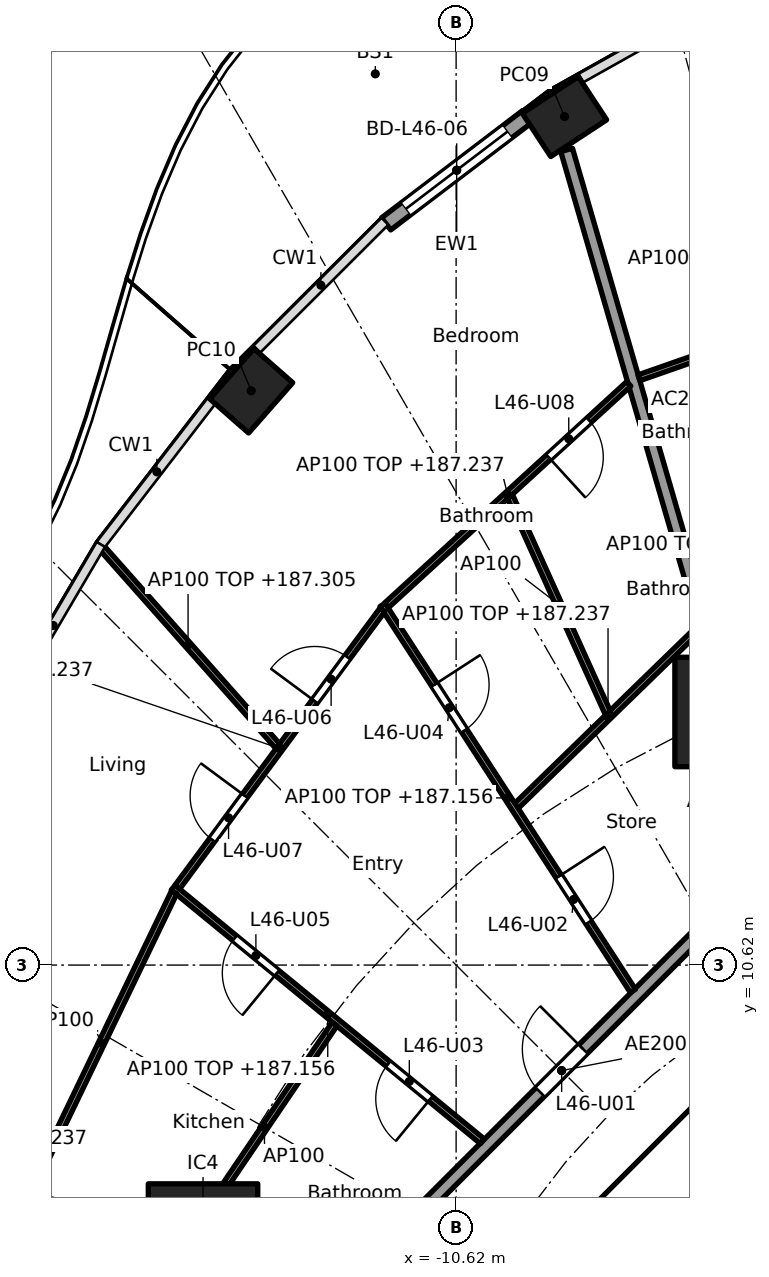
"""IFC4 building model, lengths in metres.
Left out: names, types, materials, properties, quantities, classifications, styles, units other than length and angle.
Written with IfcOpenShell. Run it as: python <this file> out.ifc"""

import sys

from ifc_helpers import new_model, si_unit, direction, frame, frame_2d, origin, origin_2d, place, context, subcontext, project, spatial, rectangle, hollow_rectangle, extrude, element, fill, save


model = new_model("IFC4")
c1 = context("Model", 3, precision=1e-05, world=origin(), true_north=direction((0.0, 1.0)))
c2 = subcontext(c1, "Body", "Model", "MODEL_VIEW")
j1 = project(units=[si_unit("LENGTHUNIT", "METRE"), si_unit("PLANEANGLEUNIT", "RADIAN")], contexts=[c1])
p1 = place(None, origin())
s1 = spatial("IfcSite", under=j1, at=p1, CompositionType="ELEMENT")
p2 = place(p1, origin())
s2 = spatial("IfcBuilding", under=s1, at=p2, CompositionType="ELEMENT")
p3 = place(p2, frame((0.0, 0.0, 184.4)))
s3 = spatial("IfcBuildingStorey", under=s2, at=p3, CompositionType="ELEMENT", Elevation=184.4)
for number, where, z_axis, x_axis in (
    (1, (-8.837, 24.573, 0.0), (0.0, 0.0, 1.0), (-0.836, -0.549, 0.0)),
    (2, (-13.989, 20.064, 0.0), (0.0, 0.0, 1.0), (-0.66, -0.751, 0.0)),
):
    element("IfcColumn", number, at=place(p3, frame(where, z_axis=z_axis, x_axis=x_axis)), inside=s3, PredefinedType="COLUMN", context=c2, shape_type="SweptSolid", body=[
        extrude(hollow_rectangle(XDim=1.1, YDim=0.85, WallThickness=0.036, at=origin_2d()), origin(), (0.0, 0.0, 1.0), 3.7),
    ])
for number, where, z_axis, x_axis in (
    (3, (-6.123, 14.782, 0.0), (0.0, 0.0, 1.0), (1.0, 0.0, 0.0)),
    (4, (-14.782, 6.123, 0.0), (0.0, 0.0, 1.0), (1.0, 0.0, 0.0)),
):
    element("IfcColumn", number, at=place(p3, frame(where, z_axis=z_axis, x_axis=x_axis)), inside=s3, PredefinedType="COLUMN", context=c2, shape_type="SweptSolid", body=[
        extrude(rectangle(XDim=1.8, YDim=1.8, at=origin_2d()), origin(), (0.0, 0.0, 1.0), 3.7),
    ])
p4 = place(p3, frame((-11.772, 22.809, 0.0), z_axis=(0.0, 0.0, 1.0), x_axis=(0.796055733703, 0.60522332146, 0.0)))
e5 = element("IfcWall", 5, at=p4, inside=s3, PredefinedType="SOLIDWALL", context=c2, shape_type="SweptSolid", body=[
    extrude(rectangle(XDim=2.917, YDim=0.25, at=frame_2d((1.458, 0.0))), origin(), (0.0, 0.0, 1.0), 3.44),
])
p5 = place(p4, frame((0.408, 0.0, 0.0)))
e6 = element("IfcOpeningElement", 6, at=p5, cuts=e5, PredefinedType="OPENING", context=c2, shape_type="SweptSolid", body=[
    extrude(rectangle(XDim=2.1, YDim=2.4, at=frame_2d((1.05, 1.2))), frame((0.0, 0.135, 0.0), z_axis=(0.0, -1.0, 0.0), x_axis=(1.0, 0.0, 0.0)), (0.0, 0.0, 1.0), 0.27),
])
p6 = place(p3, frame((-4.613, 9.988, 0.0), z_axis=(0.0, 0.0, 1.0), x_axis=(-0.707106781187, -0.707106781187, 0.0)))
e7 = element("IfcWall", 7, at=p6, inside=s3, PredefinedType="SHEAR", context=c2, shape_type="SweptSolid", body=[
    extrude(rectangle(XDim=7.602, YDim=0.6, at=frame_2d((3.801, 0.0))), origin(), (0.0, 0.0, 1.0), 3.44),
])
p7 = place(p6, frame((0.351, 0.0, 0.0)))
e8 = element("IfcOpeningElement", 8, at=p7, cuts=e7, PredefinedType="OPENING", context=c2, shape_type="SweptSolid", body=[
    extrude(rectangle(XDim=1.1, YDim=2.1, at=frame_2d((0.55, 1.05))), frame((0.0, 0.31, 0.0), z_axis=(0.0, -1.0, 0.0), x_axis=(1.0, 0.0, 0.0)), (0.0, 0.0, 1.0), 0.62),
])
p8 = place(p3, frame((-6.137, 14.83, 0.0), z_axis=(0.0, 0.0, 1.0), x_axis=(-0.278461169897, 0.96044748782, 0.0)))
e9 = element("IfcWall", 9, at=p8, inside=s3, PredefinedType="PARTITIONING", context=c2, shape_type="SweptSolid", body=[
    extrude(rectangle(XDim=9.573, YDim=0.2, at=frame_2d((4.787, 0.0))), origin(), (0.0, 0.0, 1.0), 2.837),
])
p9 = place(p3, frame((-14.831, 6.134, 0.0), z_axis=(0.0, 0.0, 1.0), x_axis=(-0.976568396888, 0.215207263354, 0.0)))
e10 = element("IfcWall", 10, at=p9, inside=s3, PredefinedType="PARTITIONING", context=c2, shape_type="SweptSolid", body=[
    extrude(rectangle(XDim=5.177, YDim=0.2, at=frame_2d((2.588, 0.0))), origin(), (0.0, 0.0, 1.0), 2.837),
])
p10 = place(p3, frame((-5.275, 12.494, 0.0), z_axis=(0.0, 0.0, 1.0), x_axis=(-0.707106781187, -0.707106781187, 0.0)))
e11 = element("IfcWall", 11, at=p10, inside=s3, PredefinedType="PARTITIONING", context=c2, shape_type="SweptSolid", body=[
    extrude(rectangle(XDim=10.209, YDim=0.2, at=frame_2d((5.104, 0.0))), origin(), (0.0, 0.0, 1.0), 3.44),
])
p11 = place(p10, frame((4.604, 0.0, 0.0)))
e12 = element("IfcOpeningElement", 12, at=p11, cuts=e11, PredefinedType="OPENING", context=c2, shape_type="SweptSolid", body=[
    extrude(rectangle(XDim=1.0, YDim=2.1, at=frame_2d((0.5, 1.05))), frame((0.0, 0.11, 0.0), z_axis=(0.0, -1.0, 0.0), x_axis=(1.0, 0.0, 0.0)), (0.0, 0.0, 1.0), 0.22),
])
p12 = place(p3, frame((-2.452, 22.083, 0.0), z_axis=(0.0, 0.0, 1.0), x_axis=(-0.943918212431, -0.330179357684, 0.0)))
e13 = element("IfcWall", 13, at=p12, inside=s3, PredefinedType="PARTITIONING", context=c2, shape_type="SweptSolid", body=[
    extrude(rectangle(XDim=5.467, YDim=0.1, at=frame_2d((2.734, 0.0))), origin(), (0.0, 0.0, 1.0), 2.837),
])
p13 = place(p3, frame((-6.616, 16.166, 0.0), z_axis=(0.0, 0.0, 1.0), x_axis=(-0.716919058692, -0.697156412352, 0.0)))
e14 = element("IfcWall", 14, at=p13, inside=s3, PredefinedType="PARTITIONING", context=c2, shape_type="SweptSolid", body=[
    extrude(rectangle(XDim=4.2, YDim=0.1, at=frame_2d((2.1, 0.0))), origin(), (0.0, 0.0, 1.0), 2.837),
])
p14 = place(p3, frame((-7.781, 20.178, 0.0), z_axis=(0.0, 0.0, 1.0), x_axis=(-0.73807320557, -0.674720640872, 0.0)))
e15 = element("IfcWall", 15, at=p14, inside=s3, PredefinedType="PARTITIONING", context=c2, shape_type="SweptSolid", body=[
    extrude(rectangle(XDim=5.399, YDim=0.1, at=frame_2d((2.699, 0.0))), origin(), (0.0, 0.0, 1.0), 2.837),
])
p15 = place(p14, frame((0.887, 0.0, 0.0)))
e16 = element("IfcOpeningElement", 16, at=p15, cuts=e15, PredefinedType="OPENING", context=c2, shape_type="SweptSolid", body=[
    extrude(rectangle(XDim=0.9, YDim=2.1, at=frame_2d((0.45, 1.05))), frame((0.0, 0.06, 0.0), z_axis=(0.0, -1.0, 0.0), x_axis=(1.0, 0.0, 0.0)), (0.0, 0.0, 1.0), 0.12),
])
p16 = place(p3, frame((-8.125, 14.765, 0.0), z_axis=(0.0, 0.0, 1.0), x_axis=(-0.411745679848, 0.911298795745, 0.0)))
e17 = element("IfcWall", 17, at=p16, inside=s3, PredefinedType="PARTITIONING", context=c2, shape_type="SweptSolid", body=[
    extrude(rectangle(XDim=3.909, YDim=0.1, at=frame_2d((1.955, 0.0))), origin(), (0.0, 0.0, 1.0), 3.44),
])
p17 = place(p3, frame((-7.712, 10.195, 0.0), z_axis=(0.0, 0.0, 1.0), x_axis=(-0.544179442551, 0.838968851809, 0.0)))
e18 = element("IfcWall", 18, at=p17, inside=s3, PredefinedType="PARTITIONING", context=c2, shape_type="SweptSolid", body=[
    extrude(rectangle(XDim=7.566, YDim=0.1, at=frame_2d((3.783, 0.0))), origin(), (0.0, 0.0, 1.0), 2.756),
])
p18 = place(p17, frame((1.343, 0.0, 0.0)))
e19 = element("IfcOpeningElement", 19, at=p18, cuts=e18, PredefinedType="OPENING", context=c2, shape_type="SweptSolid", body=[
    extrude(rectangle(XDim=0.9, YDim=2.1, at=frame_2d((0.45, 1.05))), frame((0.0, 0.06, 0.0), z_axis=(0.0, -1.0, 0.0), x_axis=(1.0, 0.0, 0.0)), (0.0, 0.0, 1.0), 0.12),
])
p19 = place(p17, frame((5.101, 0.0, 0.0)))
e20 = element("IfcOpeningElement", 20, at=p19, cuts=e18, PredefinedType="OPENING", context=c2, shape_type="SweptSolid", body=[
    extrude(rectangle(XDim=0.9, YDim=2.1, at=frame_2d((0.45, 1.05))), frame((0.0, 0.06, 0.0), z_axis=(0.0, -1.0, 0.0), x_axis=(1.0, 0.0, 0.0)), (0.0, 0.0, 1.0), 0.12),
])
p20 = place(p3, frame((-11.832, 16.461, 0.0), z_axis=(0.0, 0.0, 1.0), x_axis=(-0.594704483906, -0.803944386647, 0.0)))
e21 = element("IfcWall", 21, at=p20, inside=s3, PredefinedType="PARTITIONING", context=c2, shape_type="SweptSolid", body=[
    extrude(rectangle(XDim=5.672, YDim=0.1, at=frame_2d((2.836, 0.0))), origin(), (0.0, 0.0, 1.0), 2.837),
])
p21 = place(p20, frame((0.968, 0.0, 0.0)))
e22 = element("IfcOpeningElement", 22, at=p21, cuts=e21, PredefinedType="OPENING", context=c2, shape_type="SweptSolid", body=[
    extrude(rectangle(XDim=0.9, YDim=2.1, at=frame_2d((0.45, 1.05))), frame((0.0, 0.06, 0.0), z_axis=(0.0, -1.0, 0.0), x_axis=(1.0, 0.0, 0.0)), (0.0, 0.0, 1.0), 0.12),
])
p22 = place(p20, frame((3.804, 0.0, 0.0)))
e23 = element("IfcOpeningElement", 23, at=p22, cuts=e21, PredefinedType="OPENING", context=c2, shape_type="SweptSolid", body=[
    extrude(rectangle(XDim=0.9, YDim=2.1, at=frame_2d((0.45, 1.05))), frame((0.0, 0.06, 0.0), z_axis=(0.0, -1.0, 0.0), x_axis=(1.0, 0.0, 0.0)), (0.0, 0.0, 1.0), 0.12),
])
p23 = place(p3, frame((-13.552, 14.219, 0.0), z_axis=(0.0, 0.0, 1.0), x_axis=(-0.663542794709, 0.748138329181, 0.0)))
e24 = element("IfcWall", 24, at=p23, inside=s3, PredefinedType="PARTITIONING", context=c2, shape_type="SweptSolid", body=[
    extrude(rectangle(XDim=4.45, YDim=0.1, at=frame_2d((2.225, 0.0))), origin(), (0.0, 0.0, 1.0), 2.905),
])
p24 = place(p3, frame((-10.189, 7.721, 0.0), z_axis=(0.0, 0.0, 1.0), x_axis=(-0.773121441079, 0.634258021112, 0.0)))
e25 = element("IfcWall", 25, at=p24, inside=s3, PredefinedType="PARTITIONING", context=c2, shape_type="SweptSolid", body=[
    extrude(rectangle(XDim=6.577, YDim=0.1, at=frame_2d((3.289, 0.0))), origin(), (0.0, 0.0, 1.0), 2.756),
])
p25 = place(p24, frame((1.104, 0.0, 0.0)))
e26 = element("IfcOpeningElement", 26, at=p25, cuts=e25, PredefinedType="OPENING", context=c2, shape_type="SweptSolid", body=[
    extrude(rectangle(XDim=0.9, YDim=2.1, at=frame_2d((0.45, 1.05))), frame((0.0, 0.06, 0.0), z_axis=(0.0, -1.0, 0.0), x_axis=(1.0, 0.0, 0.0)), (0.0, 0.0, 1.0), 0.12),
])
p26 = place(p24, frame((4.367, 0.0, 0.0)))
e27 = element("IfcOpeningElement", 27, at=p26, cuts=e25, PredefinedType="OPENING", context=c2, shape_type="SweptSolid", body=[
    extrude(rectangle(XDim=0.9, YDim=2.1, at=frame_2d((0.45, 1.05))), frame((0.0, 0.06, 0.0), z_axis=(0.0, -1.0, 0.0), x_axis=(1.0, 0.0, 0.0)), (0.0, 0.0, 1.0), 0.12),
])
p27 = place(p3, frame((-12.619, 9.65, 0.0), z_axis=(0.0, 0.0, 1.0), x_axis=(-0.561046521684, -0.82778427172, 0.0)))
e28 = element("IfcWall", 28, at=p27, inside=s3, PredefinedType="PARTITIONING", context=c2, shape_type="SweptSolid", body=[
    extrude(rectangle(XDim=4.109, YDim=0.1, at=frame_2d((2.054, 0.0))), origin(), (0.0, 0.0, 1.0), 3.44),
])
p28 = place(p3, frame((-15.257, 11.816, 0.0), z_axis=(0.0, 0.0, 1.0), x_axis=(-0.434027506504, -0.900899619046, 0.0)))
e29 = element("IfcWall", 29, at=p28, inside=s3, PredefinedType="PARTITIONING", context=c2, shape_type="SweptSolid", body=[
    extrude(rectangle(XDim=5.508, YDim=0.1, at=frame_2d((2.754, 0.0))), origin(), (0.0, 0.0, 1.0), 3.44),
])
p29 = place(p5, origin())
e30 = element("IfcDoor", 30, at=p29, inside=s3, OperationType="SLIDING_TO_LEFT", PredefinedType="DOOR", context=c2, shape_type="SweptSolid", body=[
    extrude(rectangle(XDim=2.1, YDim=2.4, at=frame_2d((1.05, 1.2))), frame((0.0, 0.025, 0.0), z_axis=(0.0, -1.0, 0.0), x_axis=(1.0, 0.0, 0.0)), (0.0, 0.0, 1.0), 0.05),
])
fill(e6, e30)
p30 = place(p11, frame((1.0, 0.0, 0.0), x_axis=(-1.0, 0.0, 0.0)))
e31 = element("IfcDoor", 31, at=p30, inside=s3, OperationType="SINGLE_SWING_RIGHT", PredefinedType="DOOR", context=c2, shape_type="SweptSolid", body=[
    extrude(rectangle(XDim=1.0, YDim=2.1, at=frame_2d((0.5, 1.05))), frame((0.0, 0.025, 0.0), z_axis=(0.0, -1.0, 0.0), x_axis=(1.0, 0.0, 0.0)), (0.0, 0.0, 1.0), 0.05),
])
fill(e12, e31)
p31 = place(p18, frame((0.9, 0.0, 0.0), x_axis=(-1.0, 0.0, 0.0)))
e32 = element("IfcDoor", 32, at=p31, inside=s3, OperationType="SINGLE_SWING_LEFT", PredefinedType="DOOR", context=c2, shape_type="SweptSolid", body=[
    extrude(rectangle(XDim=0.9, YDim=2.1, at=frame_2d((0.45, 1.05))), frame((0.0, 0.025, 0.0), z_axis=(0.0, -1.0, 0.0), x_axis=(1.0, 0.0, 0.0)), (0.0, 0.0, 1.0), 0.05),
])
fill(e19, e32)
p32 = place(p25, origin())
e33 = element("IfcDoor", 33, at=p32, inside=s3, OperationType="SINGLE_SWING_LEFT", PredefinedType="DOOR", context=c2, shape_type="SweptSolid", body=[
    extrude(rectangle(XDim=0.9, YDim=2.1, at=frame_2d((0.45, 1.05))), frame((0.0, 0.025, 0.0), z_axis=(0.0, -1.0, 0.0), x_axis=(1.0, 0.0, 0.0)), (0.0, 0.0, 1.0), 0.05),
])
fill(e26, e33)
p33 = place(p19, frame((0.9, 0.0, 0.0), x_axis=(-1.0, 0.0, 0.0)))
e34 = element("IfcDoor", 34, at=p33, inside=s3, OperationType="SINGLE_SWING_LEFT", PredefinedType="DOOR", context=c2, shape_type="SweptSolid", body=[
    extrude(rectangle(XDim=0.9, YDim=2.1, at=frame_2d((0.45, 1.05))), frame((0.0, 0.025, 0.0), z_axis=(0.0, -1.0, 0.0), x_axis=(1.0, 0.0, 0.0)), (0.0, 0.0, 1.0), 0.05),
])
fill(e20, e34)
p34 = place(p26, origin())
e35 = element("IfcDoor", 35, at=p34, inside=s3, OperationType="SINGLE_SWING_LEFT", PredefinedType="DOOR", context=c2, shape_type="SweptSolid", body=[
    extrude(rectangle(XDim=0.9, YDim=2.1, at=frame_2d((0.45, 1.05))), frame((0.0, 0.025, 0.0), z_axis=(0.0, -1.0, 0.0), x_axis=(1.0, 0.0, 0.0)), (0.0, 0.0, 1.0), 0.05),
])
fill(e27, e35)
p35 = place(p21, frame((0.9, 0.0, 0.0), x_axis=(-1.0, 0.0, 0.0)))
e36 = element("IfcDoor", 36, at=p35, inside=s3, OperationType="SINGLE_SWING_LEFT", PredefinedType="DOOR", context=c2, shape_type="SweptSolid", body=[
    extrude(rectangle(XDim=0.9, YDim=2.1, at=frame_2d((0.45, 1.05))), frame((0.0, 0.025, 0.0), z_axis=(0.0, -1.0, 0.0), x_axis=(1.0, 0.0, 0.0)), (0.0, 0.0, 1.0), 0.05),
])
fill(e22, e36)
p36 = place(p22, frame((0.9, 0.0, 0.0), x_axis=(-1.0, 0.0, 0.0)))
e37 = element("IfcDoor", 37, at=p36, inside=s3, OperationType="SINGLE_SWING_RIGHT", PredefinedType="DOOR", context=c2, shape_type="SweptSolid", body=[
    extrude(rectangle(XDim=0.9, YDim=2.1, at=frame_2d((0.45, 1.05))), frame((0.0, 0.025, 0.0), z_axis=(0.0, -1.0, 0.0), x_axis=(1.0, 0.0, 0.0)), (0.0, 0.0, 1.0), 0.05),
])
fill(e23, e37)
p37 = place(p15, origin())
e38 = element("IfcDoor", 38, at=p37, inside=s3, OperationType="SINGLE_SWING_RIGHT", PredefinedType="DOOR", context=c2, shape_type="SweptSolid", body=[
    extrude(rectangle(XDim=0.9, YDim=2.1, at=frame_2d((0.45, 1.05))), frame((0.0, 0.025, 0.0), z_axis=(0.0, -1.0, 0.0), x_axis=(1.0, 0.0, 0.0)), (0.0, 0.0, 1.0), 0.05),
])
fill(e16, e38)
save(model, sys.argv[1])
